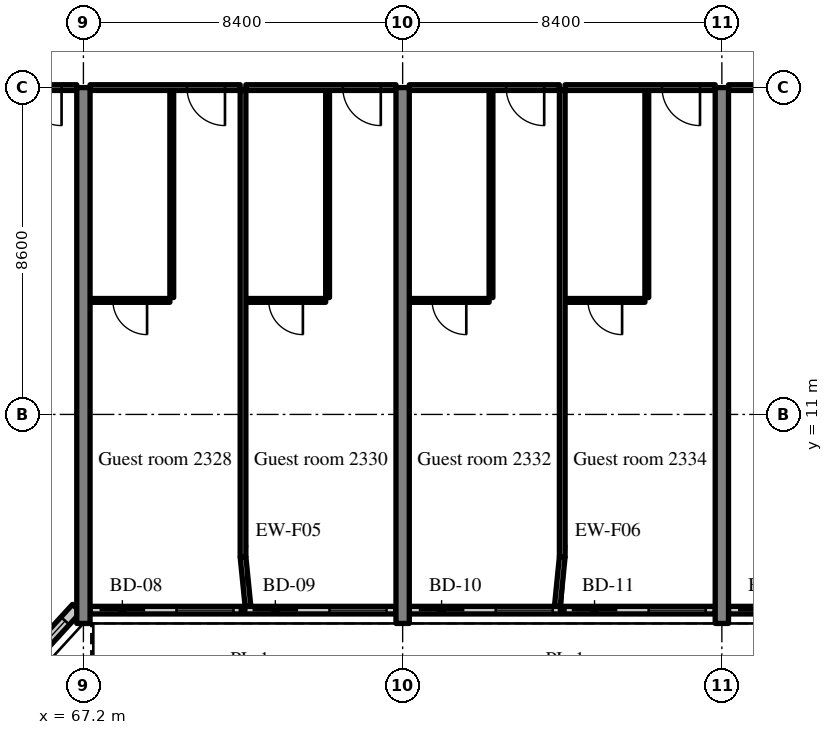
"""IFC4 building model, lengths in metres.
Left out: names, types, materials, properties, quantities, classifications, styles, units other than length and angle.
Written with IfcOpenShell. Run it as: python <this file> out.ifc"""

import sys

from ifc_helpers import new_model, si_unit, direction, frame, frame_2d, origin, place, context, subcontext, project, spatial, rectangle, extrude, source, transform, mapped, element, fill, save


model = new_model("IFC4")
c1 = context("Model", 3, precision=1e-05, world=origin(), true_north=direction((0.0, 1.0)))
c2 = subcontext(c1, "Body", "Model", "MODEL_VIEW")
j1 = project(units=[si_unit("LENGTHUNIT", "METRE"), si_unit("PLANEANGLEUNIT", "RADIAN")], contexts=[c1])
p1 = place(None, origin())
s1 = spatial("IfcSite", under=j1, at=p1, CompositionType="ELEMENT")
p2 = place(p1, origin())
s2 = spatial("IfcBuilding", under=s1, at=p2, CompositionType="ELEMENT")
p3 = place(p2, frame((0.0, 0.0, 99.0)))
s3 = spatial("IfcBuildingStorey", under=s2, at=p3, CompositionType="ELEMENT", Elevation=99.0)
m1 = source(origin(), c2, "Body", "SweptSolid", [
    extrude(rectangle(XDim=14.1, YDim=0.35, at=frame_2d((7.05, 0.0))), origin(), (0.0, 0.0, 1.0), 3.52),
])
for number, where, z_axis, x_axis in (
    (1, (67.2, 5.5, 0.0), (0.0, 0.0, 1.0), (0.0, 1.0, 0.0)),
    (2, (75.6, 5.5, 0.0), (0.0, 0.0, 1.0), (0.0, 1.0, 0.0)),
    (3, (84.0, 5.5, 0.0), (0.0, 0.0, 1.0), (0.0, 1.0, 0.0)),
):
    element("IfcWall", number, at=place(p3, frame(where, z_axis=z_axis, x_axis=x_axis)), inside=s3, PredefinedType="SHEAR", context=c2, shape_type="MappedRepresentation", body=[
        mapped(m1, transform((0.0, 0.0, 0.0), scale=1.0)),
    ])
m2 = source(origin(), c2, "Body", "SweptSolid", [
    extrude(rectangle(XDim=2.398, YDim=0.3, at=frame_2d((1.199, 0.0))), origin(), (0.0, 0.0, 1.0), 3.52),
])
p4 = place(p3, frame((65.404, 4.131, 0.0), z_axis=(0.0, 0.0, 1.0), x_axis=(0.675374189419, 0.737475222815, 0.0)))
e4 = element("IfcWall", 4, at=p4, inside=s3, PredefinedType="SOLIDWALL", context=c2, shape_type="MappedRepresentation", body=[
    mapped(m2, transform((0.0, 0.0, 0.0), scale=1.0)),
])
m3 = source(origin(), c2, "Body", "SweptSolid", [
    extrude(rectangle(XDim=1.5, YDim=2.0, at=frame_2d((0.75, 1.0))), frame((0.0, 0.16, 0.0), z_axis=(0.0, -1.0, 0.0), x_axis=(1.0, 0.0, 0.0)), (0.0, 0.0, 1.0), 0.32),
])
p5 = place(p4, frame((0.449, 0.0, 0.9)))
e5 = element("IfcOpeningElement", 5, at=p5, cuts=e4, PredefinedType="OPENING", context=c2, shape_type="MappedRepresentation", body=[
    mapped(m3, transform((0.0, 0.0, 0.0), scale=1.0)),
])
m4 = source(origin(), c2, "Body", "SweptSolid", [
    extrude(rectangle(XDim=8.05, YDim=0.2, at=frame_2d((4.025, 0.0))), origin(), (0.0, 0.0, 1.0), 2.82),
])
p6 = place(p3, frame((67.375, 5.85, 0.0), z_axis=(0.0, 0.0, 1.0), x_axis=(1.0, 0.0, 0.0)))
e6 = element("IfcWall", 6, at=p6, inside=s3, PredefinedType="SOLIDWALL", context=c2, shape_type="MappedRepresentation", body=[
    mapped(m4, transform((0.0, 0.0, 0.0), scale=1.0)),
])
m5 = source(origin(), c2, "Body", "SweptSolid", [
    extrude(rectangle(XDim=1.2, YDim=2.4, at=frame_2d((0.6, 1.2))), frame((0.0, 0.11, 0.0), z_axis=(0.0, -1.0, 0.0), x_axis=(1.0, 0.0, 0.0)), (0.0, 0.0, 1.0), 0.22),
])
p7 = place(p6, frame((0.25, 0.0, 0.0)))
e7 = element("IfcOpeningElement", 7, at=p7, cuts=e6, PredefinedType="OPENING", context=c2, shape_type="MappedRepresentation", body=[
    mapped(m5, transform((0.0, 0.0, 0.0), scale=1.0)),
])
m6 = source(origin(), c2, "Body", "SweptSolid", [
    extrude(rectangle(XDim=1.5, YDim=1.5, at=frame_2d((0.75, 0.75))), frame((0.0, 0.11, 0.0), z_axis=(0.0, -1.0, 0.0), x_axis=(1.0, 0.0, 0.0)), (0.0, 0.0, 1.0), 0.22),
])
p8 = place(p6, frame((2.275, 0.0, 0.9)))
e8 = element("IfcOpeningElement", 8, at=p8, cuts=e6, PredefinedType="OPENING", context=c2, shape_type="MappedRepresentation", body=[
    mapped(m6, transform((0.0, 0.0, 0.0), scale=1.0)),
])
p9 = place(p6, frame((4.275, 0.0, 0.0)))
e9 = element("IfcOpeningElement", 9, at=p9, cuts=e6, PredefinedType="OPENING", context=c2, shape_type="MappedRepresentation", body=[
    mapped(m5, transform((0.0, 0.0, 0.0), scale=1.0)),
])
p10 = place(p6, frame((6.3, 0.0, 0.9)))
e10 = element("IfcOpeningElement", 10, at=p10, cuts=e6, PredefinedType="OPENING", context=c2, shape_type="MappedRepresentation", body=[
    mapped(m6, transform((0.0, 0.0, 0.0), scale=1.0)),
])
p11 = place(p3, frame((75.775, 5.85, 0.0), z_axis=(0.0, 0.0, 1.0), x_axis=(1.0, 0.0, 0.0)))
e11 = element("IfcWall", 11, at=p11, inside=s3, PredefinedType="SOLIDWALL", context=c2, shape_type="MappedRepresentation", body=[
    mapped(m4, transform((0.0, 0.0, 0.0), scale=1.0)),
])
p12 = place(p11, frame((0.25, 0.0, 0.0)))
e12 = element("IfcOpeningElement", 12, at=p12, cuts=e11, PredefinedType="OPENING", context=c2, shape_type="MappedRepresentation", body=[
    mapped(m5, transform((0.0, 0.0, 0.0), scale=1.0)),
])
p13 = place(p11, frame((2.275, 0.0, 0.9)))
e13 = element("IfcOpeningElement", 13, at=p13, cuts=e11, PredefinedType="OPENING", context=c2, shape_type="MappedRepresentation", body=[
    mapped(m6, transform((0.0, 0.0, 0.0), scale=1.0)),
])
p14 = place(p11, frame((4.275, 0.0, 0.0)))
e14 = element("IfcOpeningElement", 14, at=p14, cuts=e11, PredefinedType="OPENING", context=c2, shape_type="MappedRepresentation", body=[
    mapped(m5, transform((0.0, 0.0, 0.0), scale=1.0)),
])
p15 = place(p11, frame((6.3, 0.0, 0.9)))
e15 = element("IfcOpeningElement", 15, at=p15, cuts=e11, PredefinedType="OPENING", context=c2, shape_type="MappedRepresentation", body=[
    mapped(m6, transform((0.0, 0.0, 0.0), scale=1.0)),
])
p16 = place(p3, frame((84.175, 5.85, 0.0), z_axis=(0.0, 0.0, 1.0), x_axis=(1.0, 0.0, 0.0)))
e16 = element("IfcWall", 16, at=p16, inside=s3, PredefinedType="SOLIDWALL", context=c2, shape_type="MappedRepresentation", body=[
    mapped(m4, transform((0.0, 0.0, 0.0), scale=1.0)),
])
p17 = place(p16, frame((0.25, 0.0, 0.0)))
e17 = element("IfcOpeningElement", 17, at=p17, cuts=e16, PredefinedType="OPENING", context=c2, shape_type="MappedRepresentation", body=[
    mapped(m5, transform((0.0, 0.0, 0.0), scale=1.0)),
])
p18 = place(p16, frame((2.275, 0.0, 0.9)))
e18 = element("IfcOpeningElement", 18, at=p18, cuts=e16, PredefinedType="OPENING", context=c2, shape_type="MappedRepresentation", body=[
    mapped(m6, transform((0.0, 0.0, 0.0), scale=1.0)),
])
p19 = place(p16, frame((4.275, 0.0, 0.0)))
e19 = element("IfcOpeningElement", 19, at=p19, cuts=e16, PredefinedType="OPENING", context=c2, shape_type="MappedRepresentation", body=[
    mapped(m5, transform((0.0, 0.0, 0.0), scale=1.0)),
])
p20 = place(p16, frame((6.3, 0.0, 0.9)))
e20 = element("IfcOpeningElement", 20, at=p20, cuts=e16, PredefinedType="OPENING", context=c2, shape_type="MappedRepresentation", body=[
    mapped(m6, transform((0.0, 0.0, 0.0), scale=1.0)),
])
m7 = source(origin(), c2, "Body", "SweptSolid", [
    extrude(rectangle(XDim=8.05, YDim=0.15, at=frame_2d((4.025, 0.0))), origin(), (0.0, 0.0, 1.0), 2.82),
])
p21 = place(p3, frame((58.975, 19.6, 0.0), z_axis=(0.0, 0.0, 1.0), x_axis=(1.0, 0.0, 0.0)))
e21 = element("IfcWall", 21, at=p21, inside=s3, PredefinedType="PARTITIONING", context=c2, shape_type="MappedRepresentation", body=[
    mapped(m7, transform((0.0, 0.0, 0.0), scale=1.0)),
])
m8 = source(origin(), c2, "Body", "SweptSolid", [
    extrude(rectangle(XDim=1.0, YDim=2.1, at=frame_2d((0.5, 1.05))), frame((0.0, 0.085, 0.0), z_axis=(0.0, -1.0, 0.0), x_axis=(1.0, 0.0, 0.0)), (0.0, 0.0, 1.0), 0.17),
])
p22 = place(p21, frame((6.65, 0.0, 0.0)))
e22 = element("IfcOpeningElement", 22, at=p22, cuts=e21, PredefinedType="OPENING", context=c2, shape_type="MappedRepresentation", body=[
    mapped(m8, transform((0.0, 0.0, 0.0), scale=1.0)),
])
m9 = source(origin(), c2, "Body", "SweptSolid", [
    extrude(rectangle(XDim=5.45, YDim=0.1, at=frame_2d((2.725, 0.0))), origin(), (0.0, 0.0, 1.0), 3.52),
])
p23 = place(p3, frame((69.525, 14.075, 0.0), z_axis=(0.0, 0.0, 1.0), x_axis=(0.0, 1.0, 0.0)))
e23 = element("IfcWall", 23, at=p23, inside=s3, PredefinedType="PARTITIONING", context=c2, shape_type="MappedRepresentation", body=[
    mapped(m9, transform((0.0, 0.0, 0.0), scale=1.0)),
])
m10 = source(origin(), c2, "Body", "SweptSolid", [
    extrude(rectangle(XDim=2.1, YDim=0.1, at=frame_2d((1.05, 0.0))), origin(), (0.0, 0.0, 1.0), 3.52),
])
p24 = place(p3, frame((67.375, 14.0, 0.0), z_axis=(0.0, 0.0, 1.0), x_axis=(1.0, 0.0, 0.0)))
e24 = element("IfcWall", 24, at=p24, inside=s3, PredefinedType="PARTITIONING", context=c2, shape_type="MappedRepresentation", body=[
    mapped(m10, transform((0.0, 0.0, 0.0), scale=1.0)),
])
m11 = source(origin(), c2, "Body", "SweptSolid", [
    extrude(rectangle(XDim=0.9, YDim=2.1, at=frame_2d((0.45, 1.05))), frame((0.0, 0.06, 0.0), z_axis=(0.0, -1.0, 0.0), x_axis=(1.0, 0.0, 0.0)), (0.0, 0.0, 1.0), 0.12),
])
p25 = place(p24, frame((0.6, 0.0, 0.0)))
e25 = element("IfcOpeningElement", 25, at=p25, cuts=e24, PredefinedType="OPENING", context=c2, shape_type="MappedRepresentation", body=[
    mapped(m11, transform((0.0, 0.0, 0.0), scale=1.0)),
])
m12 = source(origin(), c2, "Body", "SweptSolid", [
    extrude(rectangle(XDim=3.95, YDim=0.15, at=frame_2d((1.975, 0.0))), origin(), (0.0, 0.0, 1.0), 2.82),
])
p26 = place(p3, frame((67.375, 19.6, 0.0), z_axis=(0.0, 0.0, 1.0), x_axis=(1.0, 0.0, 0.0)))
e26 = element("IfcWall", 26, at=p26, inside=s3, PredefinedType="PARTITIONING", context=c2, shape_type="MappedRepresentation", body=[
    mapped(m12, transform((0.0, 0.0, 0.0), scale=1.0)),
])
p27 = place(p26, frame((2.55, 0.0, 0.0)))
e27 = element("IfcOpeningElement", 27, at=p27, cuts=e26, PredefinedType="OPENING", context=c2, shape_type="MappedRepresentation", body=[
    mapped(m8, transform((0.0, 0.0, 0.0), scale=1.0)),
])
p28 = place(p3, frame((73.625, 14.075, 0.0), z_axis=(0.0, 0.0, 1.0), x_axis=(0.0, 1.0, 0.0)))
e28 = element("IfcWall", 28, at=p28, inside=s3, PredefinedType="PARTITIONING", context=c2, shape_type="MappedRepresentation", body=[
    mapped(m9, transform((0.0, 0.0, 0.0), scale=1.0)),
])
m13 = source(origin(), c2, "Body", "SweptSolid", [
    extrude(rectangle(XDim=2.1, YDim=0.1, at=frame_2d((1.05, 0.0))), origin(), (0.0, 0.0, 1.0), 3.52),
])
p29 = place(p3, frame((71.475, 14.0, 0.0), z_axis=(0.0, 0.0, 1.0), x_axis=(1.0, 0.0, 0.0)))
e29 = element("IfcWall", 29, at=p29, inside=s3, PredefinedType="PARTITIONING", context=c2, shape_type="MappedRepresentation", body=[
    mapped(m13, transform((0.0, 0.0, 0.0), scale=1.0)),
])
p30 = place(p29, frame((0.6, 0.0, 0.0)))
e30 = element("IfcOpeningElement", 30, at=p30, cuts=e29, PredefinedType="OPENING", context=c2, shape_type="MappedRepresentation", body=[
    mapped(m11, transform((0.0, 0.0, 0.0), scale=1.0)),
])
p31 = place(p3, frame((71.475, 19.6, 0.0), z_axis=(0.0, 0.0, 1.0), x_axis=(1.0, 0.0, 0.0)))
e31 = element("IfcWall", 31, at=p31, inside=s3, PredefinedType="PARTITIONING", context=c2, shape_type="MappedRepresentation", body=[
    mapped(m12, transform((0.0, 0.0, 0.0), scale=1.0)),
])
p32 = place(p31, frame((2.55, 0.0, 0.0)))
e32 = element("IfcOpeningElement", 32, at=p32, cuts=e31, PredefinedType="OPENING", context=c2, shape_type="MappedRepresentation", body=[
    mapped(m8, transform((0.0, 0.0, 0.0), scale=1.0)),
])
m14 = source(origin(), c2, "Body", "SweptSolid", [
    extrude(rectangle(XDim=12.275, YDim=0.15, at=frame_2d((6.137, 0.0))), origin(), (0.0, 0.0, 1.0), 3.52),
])
p33 = place(p3, frame((71.4, 7.25, 0.0), z_axis=(0.0, 0.0, 1.0), x_axis=(0.0, 1.0, 0.0)))
e33 = element("IfcWall", 33, at=p33, inside=s3, PredefinedType="PARTITIONING", context=c2, shape_type="MappedRepresentation", body=[
    mapped(m14, transform((0.0, 0.0, 0.0), scale=1.0)),
])
p34 = place(p3, frame((77.925, 14.075, 0.0), z_axis=(0.0, 0.0, 1.0), x_axis=(0.0, 1.0, 0.0)))
e34 = element("IfcWall", 34, at=p34, inside=s3, PredefinedType="PARTITIONING", context=c2, shape_type="MappedRepresentation", body=[
    mapped(m9, transform((0.0, 0.0, 0.0), scale=1.0)),
])
p35 = place(p3, frame((75.775, 14.0, 0.0), z_axis=(0.0, 0.0, 1.0), x_axis=(1.0, 0.0, 0.0)))
e35 = element("IfcWall", 35, at=p35, inside=s3, PredefinedType="PARTITIONING", context=c2, shape_type="MappedRepresentation", body=[
    mapped(m10, transform((0.0, 0.0, 0.0), scale=1.0)),
])
p36 = place(p35, frame((0.6, 0.0, 0.0)))
e36 = element("IfcOpeningElement", 36, at=p36, cuts=e35, PredefinedType="OPENING", context=c2, shape_type="MappedRepresentation", body=[
    mapped(m11, transform((0.0, 0.0, 0.0), scale=1.0)),
])
m15 = source(origin(), c2, "Body", "SweptSolid", [
    extrude(rectangle(XDim=3.95, YDim=0.15, at=frame_2d((1.975, 0.0))), origin(), (0.0, 0.0, 1.0), 2.82),
])
p37 = place(p3, frame((75.775, 19.6, 0.0), z_axis=(0.0, 0.0, 1.0), x_axis=(1.0, 0.0, 0.0)))
e37 = element("IfcWall", 37, at=p37, inside=s3, PredefinedType="PARTITIONING", context=c2, shape_type="MappedRepresentation", body=[
    mapped(m15, transform((0.0, 0.0, 0.0), scale=1.0)),
])
p38 = place(p37, frame((2.55, 0.0, 0.0)))
e38 = element("IfcOpeningElement", 38, at=p38, cuts=e37, PredefinedType="OPENING", context=c2, shape_type="MappedRepresentation", body=[
    mapped(m8, transform((0.0, 0.0, 0.0), scale=1.0)),
])
p39 = place(p3, frame((82.025, 14.075, 0.0), z_axis=(0.0, 0.0, 1.0), x_axis=(0.0, 1.0, 0.0)))
e39 = element("IfcWall", 39, at=p39, inside=s3, PredefinedType="PARTITIONING", context=c2, shape_type="MappedRepresentation", body=[
    mapped(m9, transform((0.0, 0.0, 0.0), scale=1.0)),
])
p40 = place(p3, frame((79.875, 14.0, 0.0), z_axis=(0.0, 0.0, 1.0), x_axis=(1.0, 0.0, 0.0)))
e40 = element("IfcWall", 40, at=p40, inside=s3, PredefinedType="PARTITIONING", context=c2, shape_type="MappedRepresentation", body=[
    mapped(m10, transform((0.0, 0.0, 0.0), scale=1.0)),
])
p41 = place(p40, frame((0.6, 0.0, 0.0)))
e41 = element("IfcOpeningElement", 41, at=p41, cuts=e40, PredefinedType="OPENING", context=c2, shape_type="MappedRepresentation", body=[
    mapped(m11, transform((0.0, 0.0, 0.0), scale=1.0)),
])
p42 = place(p3, frame((79.875, 19.6, 0.0), z_axis=(0.0, 0.0, 1.0), x_axis=(1.0, 0.0, 0.0)))
e42 = element("IfcWall", 42, at=p42, inside=s3, PredefinedType="PARTITIONING", context=c2, shape_type="MappedRepresentation", body=[
    mapped(m12, transform((0.0, 0.0, 0.0), scale=1.0)),
])
p43 = place(p42, frame((2.55, 0.0, 0.0)))
e43 = element("IfcOpeningElement", 43, at=p43, cuts=e42, PredefinedType="OPENING", context=c2, shape_type="MappedRepresentation", body=[
    mapped(m8, transform((0.0, 0.0, 0.0), scale=1.0)),
])
p44 = place(p3, frame((79.8, 7.25, 0.0), z_axis=(0.0, 0.0, 1.0), x_axis=(0.0, 1.0, 0.0)))
e44 = element("IfcWall", 44, at=p44, inside=s3, PredefinedType="PARTITIONING", context=c2, shape_type="MappedRepresentation", body=[
    mapped(m14, transform((0.0, 0.0, 0.0), scale=1.0)),
])
p45 = place(p3, frame((84.175, 19.6, 0.0), z_axis=(0.0, 0.0, 1.0), x_axis=(1.0, 0.0, 0.0)))
e45 = element("IfcWall", 45, at=p45, inside=s3, PredefinedType="PARTITIONING", context=c2, shape_type="MappedRepresentation", body=[
    mapped(m12, transform((0.0, 0.0, 0.0), scale=1.0)),
])
p46 = place(p45, frame((1.475, 0.0, 0.0)))
e46 = element("IfcOpeningElement", 46, at=p46, cuts=e45, PredefinedType="OPENING", context=c2, shape_type="MappedRepresentation", body=[
    mapped(m8, transform((0.0, 0.0, 0.0), scale=1.0)),
])
m16 = source(origin(), c2, "Body", "SweptSolid", [
    extrude(rectangle(XDim=1.307, YDim=0.15, at=frame_2d((0.653, 0.0))), origin(), (0.0, 0.0, 1.0), 3.52),
])
for number, where, z_axis, x_axis in (
    (47, (71.53, 5.95, 0.0), (0.0, 0.0, 1.0), (-0.1, 0.995, 0.0)),
    (48, (79.67, 5.95, 0.0), (0.0, 0.0, 1.0), (0.1, 0.995, 0.0)),
):
    element("IfcWall", number, at=place(p3, frame(where, z_axis=z_axis, x_axis=x_axis)), inside=s3, PredefinedType="PARTITIONING", context=c2, shape_type="MappedRepresentation", body=[
        mapped(m16, transform((0.0, 0.0, 0.0), scale=1.0)),
    ])
m17 = source(origin(), c2, "Body", "SweptSolid", [
    extrude(rectangle(XDim=1.5, YDim=2.0, at=frame_2d((0.75, 1.0))), frame((0.0, 0.03, 0.0), z_axis=(0.0, -1.0, 0.0), x_axis=(1.0, 0.0, 0.0)), (0.0, 0.0, 1.0), 0.06),
])
p47 = place(p5, origin())
e49 = element("IfcWindow", 49, at=p47, inside=s3, PartitioningType="SINGLE_PANEL", PredefinedType="WINDOW", context=c2, shape_type="MappedRepresentation", body=[
    mapped(m17, transform((0.0, 0.0, 0.0), scale=1.0)),
])
fill(e5, e49)
m18 = source(origin(), c2, "Body", "SweptSolid", [
    extrude(rectangle(XDim=1.2, YDim=2.4, at=frame_2d((0.6, 1.2))), frame((0.0, 0.025, 0.0), z_axis=(0.0, -1.0, 0.0), x_axis=(1.0, 0.0, 0.0)), (0.0, 0.0, 1.0), 0.05),
])
p48 = place(p7, origin())
e50 = element("IfcDoor", 50, at=p48, inside=s3, OperationType="SLIDING_TO_RIGHT", PredefinedType="DOOR", context=c2, shape_type="MappedRepresentation", body=[
    mapped(m18, transform((0.0, 0.0, 0.0), scale=1.0)),
])
fill(e7, e50)
m19 = source(origin(), c2, "Body", "SweptSolid", [
    extrude(rectangle(XDim=1.5, YDim=1.5, at=frame_2d((0.75, 0.75))), frame((0.0, 0.03, 0.0), z_axis=(0.0, -1.0, 0.0), x_axis=(1.0, 0.0, 0.0)), (0.0, 0.0, 1.0), 0.06),
])
p49 = place(p8, origin())
e51 = element("IfcWindow", 51, at=p49, inside=s3, PartitioningType="SINGLE_PANEL", PredefinedType="WINDOW", context=c2, shape_type="MappedRepresentation", body=[
    mapped(m19, transform((0.0, 0.0, 0.0), scale=1.0)),
])
fill(e8, e51)
p50 = place(p9, origin())
e52 = element("IfcDoor", 52, at=p50, inside=s3, OperationType="SLIDING_TO_LEFT", PredefinedType="DOOR", context=c2, shape_type="MappedRepresentation", body=[
    mapped(m18, transform((0.0, 0.0, 0.0), scale=1.0)),
])
fill(e9, e52)
p51 = place(p10, origin())
e53 = element("IfcWindow", 53, at=p51, inside=s3, PartitioningType="SINGLE_PANEL", PredefinedType="WINDOW", context=c2, shape_type="MappedRepresentation", body=[
    mapped(m19, transform((0.0, 0.0, 0.0), scale=1.0)),
])
fill(e10, e53)
p52 = place(p12, origin())
e54 = element("IfcDoor", 54, at=p52, inside=s3, OperationType="SLIDING_TO_RIGHT", PredefinedType="DOOR", context=c2, shape_type="MappedRepresentation", body=[
    mapped(m18, transform((0.0, 0.0, 0.0), scale=1.0)),
])
fill(e12, e54)
p53 = place(p13, origin())
e55 = element("IfcWindow", 55, at=p53, inside=s3, PartitioningType="SINGLE_PANEL", PredefinedType="WINDOW", context=c2, shape_type="MappedRepresentation", body=[
    mapped(m19, transform((0.0, 0.0, 0.0), scale=1.0)),
])
fill(e13, e55)
p54 = place(p14, origin())
e56 = element("IfcDoor", 56, at=p54, inside=s3, OperationType="SLIDING_TO_LEFT", PredefinedType="DOOR", context=c2, shape_type="MappedRepresentation", body=[
    mapped(m18, transform((0.0, 0.0, 0.0), scale=1.0)),
])
fill(e14, e56)
p55 = place(p15, origin())
e57 = element("IfcWindow", 57, at=p55, inside=s3, PartitioningType="SINGLE_PANEL", PredefinedType="WINDOW", context=c2, shape_type="MappedRepresentation", body=[
    mapped(m19, transform((0.0, 0.0, 0.0), scale=1.0)),
])
fill(e15, e57)
p56 = place(p17, origin())
e58 = element("IfcDoor", 58, at=p56, inside=s3, OperationType="SLIDING_TO_RIGHT", PredefinedType="DOOR", context=c2, shape_type="MappedRepresentation", body=[
    mapped(m18, transform((0.0, 0.0, 0.0), scale=1.0)),
])
fill(e17, e58)
m20 = source(origin(), c2, "Body", "SweptSolid", [
    extrude(rectangle(XDim=1.0, YDim=2.1, at=frame_2d((0.5, 1.05))), frame((0.0, 0.025, 0.0), z_axis=(0.0, -1.0, 0.0), x_axis=(1.0, 0.0, 0.0)), (0.0, 0.0, 1.0), 0.05),
])
p57 = place(p22, origin())
e59 = element("IfcDoor", 59, at=p57, inside=s3, OperationType="SINGLE_SWING_RIGHT", PredefinedType="DOOR", context=c2, shape_type="MappedRepresentation", body=[
    mapped(m20, transform((0.0, 0.0, 0.0), scale=1.0)),
])
fill(e22, e59)
m21 = source(origin(), c2, "Body", "SweptSolid", [
    extrude(rectangle(XDim=0.9, YDim=2.1, at=frame_2d((0.45, 1.05))), frame((0.0, 0.025, 0.0), z_axis=(0.0, -1.0, 0.0), x_axis=(1.0, 0.0, 0.0)), (0.0, 0.0, 1.0), 0.05),
])
p58 = place(p25, origin())
e60 = element("IfcDoor", 60, at=p58, inside=s3, OperationType="SINGLE_SWING_RIGHT", PredefinedType="DOOR", context=c2, shape_type="MappedRepresentation", body=[
    mapped(m21, transform((0.0, 0.0, 0.0), scale=1.0)),
])
fill(e25, e60)
p59 = place(p27, origin())
e61 = element("IfcDoor", 61, at=p59, inside=s3, OperationType="SINGLE_SWING_RIGHT", PredefinedType="DOOR", context=c2, shape_type="MappedRepresentation", body=[
    mapped(m20, transform((0.0, 0.0, 0.0), scale=1.0)),
])
fill(e27, e61)
p60 = place(p30, origin())
e62 = element("IfcDoor", 62, at=p60, inside=s3, OperationType="SINGLE_SWING_RIGHT", PredefinedType="DOOR", context=c2, shape_type="MappedRepresentation", body=[
    mapped(m21, transform((0.0, 0.0, 0.0), scale=1.0)),
])
fill(e30, e62)
p61 = place(p32, origin())
e63 = element("IfcDoor", 63, at=p61, inside=s3, OperationType="SINGLE_SWING_RIGHT", PredefinedType="DOOR", context=c2, shape_type="MappedRepresentation", body=[
    mapped(m20, transform((0.0, 0.0, 0.0), scale=1.0)),
])
fill(e32, e63)
p62 = place(p36, origin())
e64 = element("IfcDoor", 64, at=p62, inside=s3, OperationType="SINGLE_SWING_RIGHT", PredefinedType="DOOR", context=c2, shape_type="MappedRepresentation", body=[
    mapped(m21, transform((0.0, 0.0, 0.0), scale=1.0)),
])
fill(e36, e64)
p63 = place(p38, origin())
e65 = element("IfcDoor", 65, at=p63, inside=s3, OperationType="SINGLE_SWING_RIGHT", PredefinedType="DOOR", context=c2, shape_type="MappedRepresentation", body=[
    mapped(m20, transform((0.0, 0.0, 0.0), scale=1.0)),
])
fill(e38, e65)
p64 = place(p41, origin())
e66 = element("IfcDoor", 66, at=p64, inside=s3, OperationType="SINGLE_SWING_RIGHT", PredefinedType="DOOR", context=c2, shape_type="MappedRepresentation", body=[
    mapped(m21, transform((0.0, 0.0, 0.0), scale=1.0)),
])
fill(e41, e66)
p65 = place(p43, origin())
e67 = element("IfcDoor", 67, at=p65, inside=s3, OperationType="SINGLE_SWING_RIGHT", PredefinedType="DOOR", context=c2, shape_type="MappedRepresentation", body=[
    mapped(m20, transform((0.0, 0.0, 0.0), scale=1.0)),
])
fill(e43, e67)
save(model, sys.argv[1])
